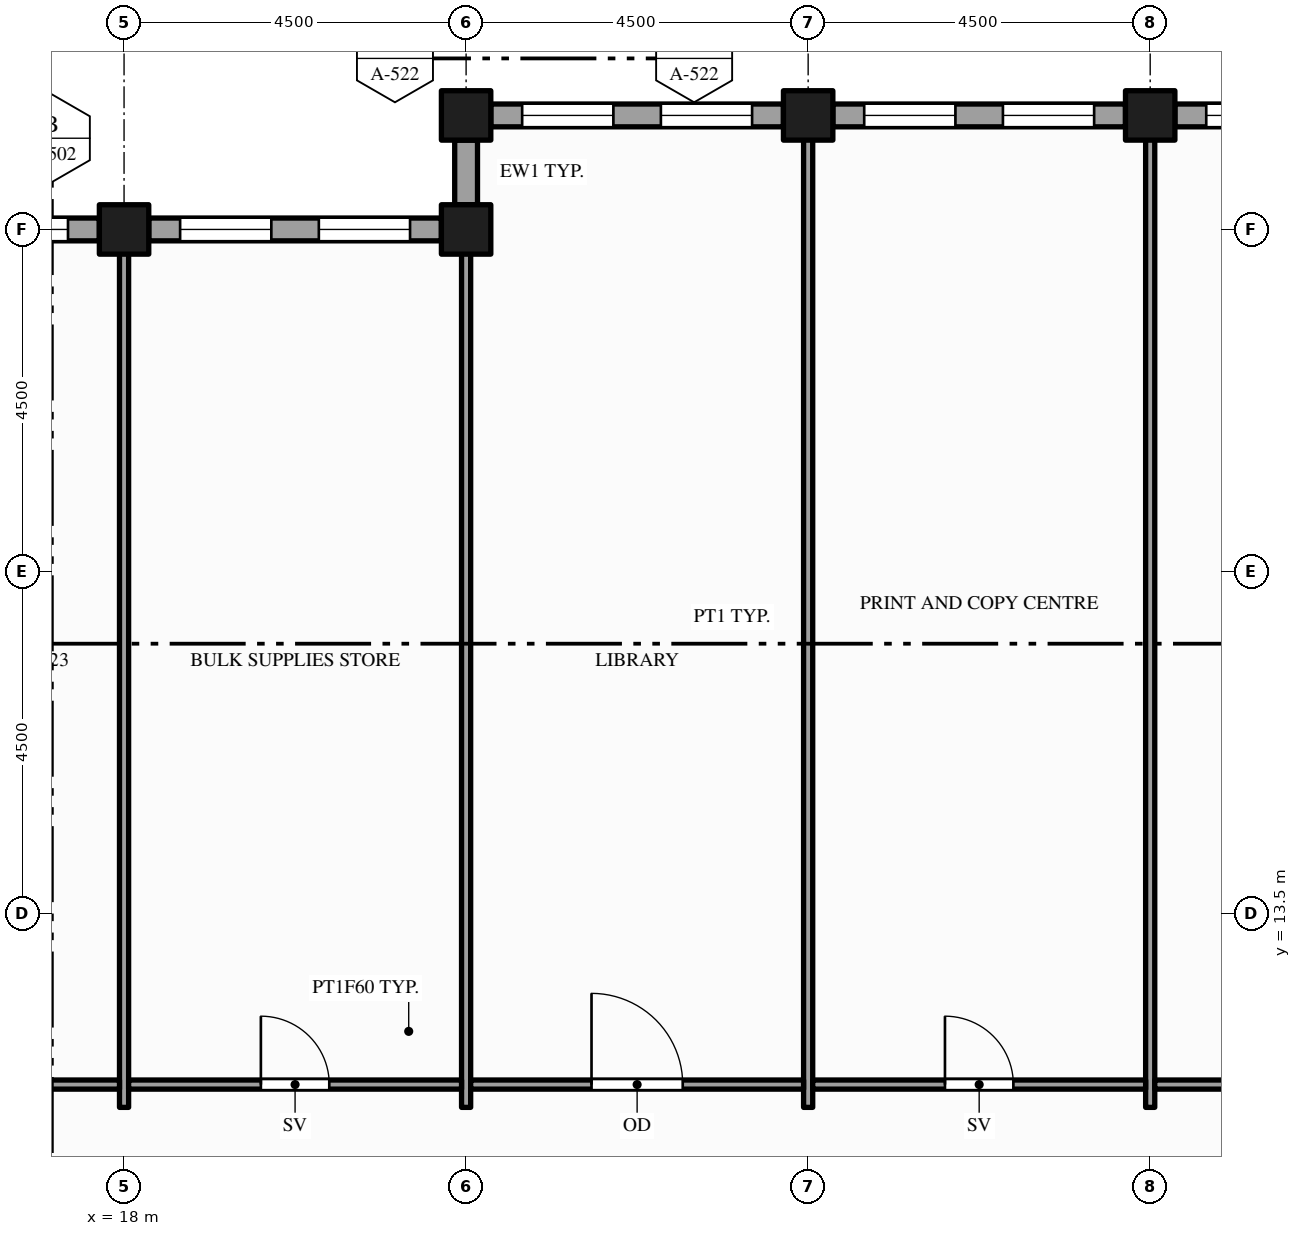
"""IFC4 building model, lengths in metres.
Left out: names, types, materials, properties, quantities, classifications, styles, units other than length and angle.
Written with IfcOpenShell. Run it as: python <this file> out.ifc"""

import sys

from ifc_helpers import new_model, si_unit, direction, frame, frame_2d, origin, origin_2d, place, context, subcontext, project, spatial, rectangle, hollow_rectangle, extrude, element, fill, save


model = new_model("IFC4")
c1 = context("Model", 3, precision=1e-05, world=origin(), true_north=direction((0.0, 1.0)))
c2 = subcontext(c1, "Body", "Model", "MODEL_VIEW")
j1 = project(units=[si_unit("LENGTHUNIT", "METRE"), si_unit("PLANEANGLEUNIT", "RADIAN")], contexts=[c1])
p1 = place(None, origin())
s1 = spatial("IfcSite", under=j1, at=p1, CompositionType="ELEMENT")
p2 = place(p1, origin())
s2 = spatial("IfcBuilding", under=s1, at=p2, CompositionType="ELEMENT")
p3 = place(p2, frame((0.0, 0.0, 293.0)))
s3 = spatial("IfcBuildingStorey", under=s2, at=p3, CompositionType="ELEMENT", Elevation=293.0)
for number, where, z_axis, x_axis in (
    (1, (18.0, 22.5, -0.15), (0.0, 0.0, 1.0), (1.0, 0.0, 0.0)),
    (2, (22.5, 22.5, -0.15), (0.0, 0.0, 1.0), (1.0, 0.0, 0.0)),
    (3, (22.5, 24.0, -0.15), (0.0, 0.0, 1.0), (1.0, 0.0, 0.0)),
    (4, (27.0, 24.0, -0.15), (0.0, 0.0, 1.0), (1.0, 0.0, 0.0)),
    (5, (31.5, 24.0, -0.15), (0.0, 0.0, 1.0), (1.0, 0.0, 0.0)),
):
    element("IfcColumn", number, at=place(p3, frame(where, z_axis=z_axis, x_axis=x_axis)), inside=s3, PredefinedType="COLUMN", context=c2, shape_type="SweptSolid", body=[
        extrude(hollow_rectangle(XDim=0.65, YDim=0.65, WallThickness=0.032, at=origin_2d()), origin(), (0.0, 0.0, 1.0), 3.9),
    ])
p4 = place(p3, frame((35.675, 24.0, 0.0), z_axis=(0.0, 0.0, 1.0), x_axis=(-1.0, 0.0, 0.0)))
e6 = element("IfcWall", 6, at=p4, inside=s3, PredefinedType="STANDARD", context=c2, shape_type="SweptSolid", body=[
    extrude(rectangle(XDim=3.85, YDim=0.3, at=frame_2d((1.925, 0.0))), origin(), (0.0, 0.0, 1.0), 3.062),
])
p5 = place(p4, frame((0.413, 0.0, 0.9)))
e7 = element("IfcOpeningElement", 7, at=p5, cuts=e6, PredefinedType="OPENING", context=c2, shape_type="SweptSolid", body=[
    extrude(rectangle(XDim=1.2, YDim=2.0, at=frame_2d((0.6, 1.0))), frame((0.0, 0.16, 0.0), z_axis=(0.0, -1.0, 0.0), x_axis=(1.0, 0.0, 0.0)), (0.0, 0.0, 1.0), 0.32),
])
p6 = place(p4, frame((2.238, 0.0, 0.9)))
e8 = element("IfcOpeningElement", 8, at=p6, cuts=e6, PredefinedType="OPENING", context=c2, shape_type="SweptSolid", body=[
    extrude(rectangle(XDim=1.2, YDim=2.0, at=frame_2d((0.6, 1.0))), frame((0.0, 0.16, 0.0), z_axis=(0.0, -1.0, 0.0), x_axis=(1.0, 0.0, 0.0)), (0.0, 0.0, 1.0), 0.32),
])
p7 = place(p3, frame((31.175, 24.0, 0.0), z_axis=(0.0, 0.0, 1.0), x_axis=(-1.0, 0.0, 0.0)))
e9 = element("IfcWall", 9, at=p7, inside=s3, PredefinedType="STANDARD", context=c2, shape_type="SweptSolid", body=[
    extrude(rectangle(XDim=3.85, YDim=0.3, at=frame_2d((1.925, 0.0))), origin(), (0.0, 0.0, 1.0), 3.062),
])
p8 = place(p7, frame((0.413, 0.0, 0.9)))
e10 = element("IfcOpeningElement", 10, at=p8, cuts=e9, PredefinedType="OPENING", context=c2, shape_type="SweptSolid", body=[
    extrude(rectangle(XDim=1.2, YDim=2.0, at=frame_2d((0.6, 1.0))), frame((0.0, 0.16, 0.0), z_axis=(0.0, -1.0, 0.0), x_axis=(1.0, 0.0, 0.0)), (0.0, 0.0, 1.0), 0.32),
])
p9 = place(p7, frame((2.238, 0.0, 0.9)))
e11 = element("IfcOpeningElement", 11, at=p9, cuts=e9, PredefinedType="OPENING", context=c2, shape_type="SweptSolid", body=[
    extrude(rectangle(XDim=1.2, YDim=2.0, at=frame_2d((0.6, 1.0))), frame((0.0, 0.16, 0.0), z_axis=(0.0, -1.0, 0.0), x_axis=(1.0, 0.0, 0.0)), (0.0, 0.0, 1.0), 0.32),
])
p10 = place(p3, frame((26.675, 24.0, 0.0), z_axis=(0.0, 0.0, 1.0), x_axis=(-1.0, 0.0, 0.0)))
e12 = element("IfcWall", 12, at=p10, inside=s3, PredefinedType="STANDARD", context=c2, shape_type="SweptSolid", body=[
    extrude(rectangle(XDim=3.85, YDim=0.3, at=frame_2d((1.925, 0.0))), origin(), (0.0, 0.0, 1.0), 3.062),
])
p11 = place(p10, frame((0.413, 0.0, 0.9)))
e13 = element("IfcOpeningElement", 13, at=p11, cuts=e12, PredefinedType="OPENING", context=c2, shape_type="SweptSolid", body=[
    extrude(rectangle(XDim=1.2, YDim=2.0, at=frame_2d((0.6, 1.0))), frame((0.0, 0.16, 0.0), z_axis=(0.0, -1.0, 0.0), x_axis=(1.0, 0.0, 0.0)), (0.0, 0.0, 1.0), 0.32),
])
p12 = place(p10, frame((2.238, 0.0, 0.9)))
e14 = element("IfcOpeningElement", 14, at=p12, cuts=e12, PredefinedType="OPENING", context=c2, shape_type="SweptSolid", body=[
    extrude(rectangle(XDim=1.2, YDim=2.0, at=frame_2d((0.6, 1.0))), frame((0.0, 0.16, 0.0), z_axis=(0.0, -1.0, 0.0), x_axis=(1.0, 0.0, 0.0)), (0.0, 0.0, 1.0), 0.32),
])
p13 = place(p3, frame((22.5, 23.675, 0.0), z_axis=(0.0, 0.0, 1.0), x_axis=(0.0, -1.0, 0.0)))
e15 = element("IfcWall", 15, at=p13, inside=s3, PredefinedType="STANDARD", context=c2, shape_type="SweptSolid", body=[
    extrude(rectangle(XDim=0.85, YDim=0.3, at=frame_2d((0.425, 0.0))), origin(), (0.0, 0.0, 1.0), 3.062),
])
p14 = place(p3, frame((22.175, 22.5, 0.0), z_axis=(0.0, 0.0, 1.0), x_axis=(-1.0, 0.0, 0.0)))
e16 = element("IfcWall", 16, at=p14, inside=s3, PredefinedType="STANDARD", context=c2, shape_type="SweptSolid", body=[
    extrude(rectangle(XDim=3.85, YDim=0.3, at=frame_2d((1.925, 0.0))), origin(), (0.0, 0.0, 1.0), 3.062),
])
p15 = place(p14, frame((0.413, 0.0, 0.9)))
e17 = element("IfcOpeningElement", 17, at=p15, cuts=e16, PredefinedType="OPENING", context=c2, shape_type="SweptSolid", body=[
    extrude(rectangle(XDim=1.2, YDim=2.0, at=frame_2d((0.6, 1.0))), frame((0.0, 0.16, 0.0), z_axis=(0.0, -1.0, 0.0), x_axis=(1.0, 0.0, 0.0)), (0.0, 0.0, 1.0), 0.32),
])
p16 = place(p14, frame((2.238, 0.0, 0.9)))
e18 = element("IfcOpeningElement", 18, at=p16, cuts=e16, PredefinedType="OPENING", context=c2, shape_type="SweptSolid", body=[
    extrude(rectangle(XDim=1.2, YDim=2.0, at=frame_2d((0.6, 1.0))), frame((0.0, 0.16, 0.0), z_axis=(0.0, -1.0, 0.0), x_axis=(1.0, 0.0, 0.0)), (0.0, 0.0, 1.0), 0.32),
])
p17 = place(p3, frame((17.675, 22.5, 0.0), z_axis=(0.0, 0.0, 1.0), x_axis=(-1.0, 0.0, 0.0)))
e19 = element("IfcWall", 19, at=p17, inside=s3, PredefinedType="STANDARD", context=c2, shape_type="SweptSolid", body=[
    extrude(rectangle(XDim=3.85, YDim=0.3, at=frame_2d((1.925, 0.0))), origin(), (0.0, 0.0, 1.0), 3.062),
])
p18 = place(p17, frame((0.413, 0.0, 0.9)))
e20 = element("IfcOpeningElement", 20, at=p18, cuts=e19, PredefinedType="OPENING", context=c2, shape_type="SweptSolid", body=[
    extrude(rectangle(XDim=1.2, YDim=2.0, at=frame_2d((0.6, 1.0))), frame((0.0, 0.16, 0.0), z_axis=(0.0, -1.0, 0.0), x_axis=(1.0, 0.0, 0.0)), (0.0, 0.0, 1.0), 0.32),
])
p19 = place(p17, frame((2.238, 0.0, 0.9)))
e21 = element("IfcOpeningElement", 21, at=p19, cuts=e19, PredefinedType="OPENING", context=c2, shape_type="SweptSolid", body=[
    extrude(rectangle(XDim=1.2, YDim=2.0, at=frame_2d((0.6, 1.0))), frame((0.0, 0.16, 0.0), z_axis=(0.0, -1.0, 0.0), x_axis=(1.0, 0.0, 0.0)), (0.0, 0.0, 1.0), 0.32),
])
for number, where, z_axis, x_axis in (
    (22, (18.0, 10.95, 0.0), (0.0, 0.0, 1.0), (0.0, 1.0, 0.0)),
    (23, (22.5, 10.95, 0.0), (0.0, 0.0, 1.0), (0.0, 1.0, 0.0)),
):
    element("IfcWall", number, at=place(p3, frame(where, z_axis=z_axis, x_axis=x_axis)), inside=s3, PredefinedType="PARTITIONING", context=c2, shape_type="SweptSolid", body=[
        extrude(rectangle(XDim=11.4, YDim=0.12, at=frame_2d((5.7, 0.0))), origin(), (0.0, 0.0, 1.0), 2.77),
    ])
for number, where, z_axis, x_axis in (
    (24, (27.0, 10.95, 0.0), (0.0, 0.0, 1.0), (0.0, 1.0, 0.0)),
    (25, (31.5, 10.95, 0.0), (0.0, 0.0, 1.0), (0.0, 1.0, 0.0)),
):
    element("IfcWall", number, at=place(p3, frame(where, z_axis=z_axis, x_axis=x_axis)), inside=s3, PredefinedType="PARTITIONING", context=c2, shape_type="SweptSolid", body=[
        extrude(rectangle(XDim=12.9, YDim=0.12, at=frame_2d((6.45, 0.0))), origin(), (0.0, 0.0, 1.0), 2.35),
    ])
p20 = place(p3, frame((13.56, 11.25, 0.0), z_axis=(0.0, 0.0, 1.0), x_axis=(1.0, 0.0, 0.0)))
e26 = element("IfcWall", 26, at=p20, inside=s3, PredefinedType="PARTITIONING", context=c2, shape_type="SweptSolid", body=[
    extrude(rectangle(XDim=4.38, YDim=0.12, at=frame_2d((2.19, 0.0))), origin(), (0.0, 0.0, 1.0), 2.77),
])
p21 = place(p20, frame((1.69, 0.0, 0.0)))
e27 = element("IfcOpeningElement", 27, at=p21, cuts=e26, PredefinedType="OPENING", context=c2, shape_type="SweptSolid", body=[
    extrude(rectangle(XDim=1.0, YDim=2.1, at=frame_2d((0.5, 1.05))), frame((0.0, 0.07, 0.0), z_axis=(0.0, -1.0, 0.0), x_axis=(1.0, 0.0, 0.0)), (0.0, 0.0, 1.0), 0.14),
])
p22 = place(p3, frame((18.06, 11.25, 0.0), z_axis=(0.0, 0.0, 1.0), x_axis=(1.0, 0.0, 0.0)))
e28 = element("IfcWall", 28, at=p22, inside=s3, PredefinedType="PARTITIONING", context=c2, shape_type="SweptSolid", body=[
    extrude(rectangle(XDim=4.38, YDim=0.12, at=frame_2d((2.19, 0.0))), origin(), (0.0, 0.0, 1.0), 2.77),
])
p23 = place(p22, frame((1.74, 0.0, 0.0)))
e29 = element("IfcOpeningElement", 29, at=p23, cuts=e28, PredefinedType="OPENING", context=c2, shape_type="SweptSolid", body=[
    extrude(rectangle(XDim=0.9, YDim=2.1, at=frame_2d((0.45, 1.05))), frame((0.0, 0.07, 0.0), z_axis=(0.0, -1.0, 0.0), x_axis=(1.0, 0.0, 0.0)), (0.0, 0.0, 1.0), 0.14),
])
p24 = place(p3, frame((22.56, 11.25, 0.0), z_axis=(0.0, 0.0, 1.0), x_axis=(1.0, 0.0, 0.0)))
e30 = element("IfcWall", 30, at=p24, inside=s3, PredefinedType="PARTITIONING", context=c2, shape_type="SweptSolid", body=[
    extrude(rectangle(XDim=4.38, YDim=0.12, at=frame_2d((2.19, 0.0))), origin(), (0.0, 0.0, 1.0), 2.77),
])
p25 = place(p24, frame((1.59, 0.0, 0.0)))
e31 = element("IfcOpeningElement", 31, at=p25, cuts=e30, PredefinedType="OPENING", context=c2, shape_type="SweptSolid", body=[
    extrude(rectangle(XDim=1.2, YDim=2.1, at=frame_2d((0.6, 1.05))), frame((0.0, 0.07, 0.0), z_axis=(0.0, -1.0, 0.0), x_axis=(1.0, 0.0, 0.0)), (0.0, 0.0, 1.0), 0.14),
])
p26 = place(p3, frame((27.06, 11.25, 0.0), z_axis=(0.0, 0.0, 1.0), x_axis=(1.0, 0.0, 0.0)))
e32 = element("IfcWall", 32, at=p26, inside=s3, PredefinedType="PARTITIONING", context=c2, shape_type="SweptSolid", body=[
    extrude(rectangle(XDim=4.38, YDim=0.12, at=frame_2d((2.19, 0.0))), origin(), (0.0, 0.0, 1.0), 2.77),
])
p27 = place(p26, frame((1.74, 0.0, 0.0)))
e33 = element("IfcOpeningElement", 33, at=p27, cuts=e32, PredefinedType="OPENING", context=c2, shape_type="SweptSolid", body=[
    extrude(rectangle(XDim=0.9, YDim=2.1, at=frame_2d((0.45, 1.05))), frame((0.0, 0.07, 0.0), z_axis=(0.0, -1.0, 0.0), x_axis=(1.0, 0.0, 0.0)), (0.0, 0.0, 1.0), 0.14),
])
p28 = place(p3, frame((31.56, 11.25, 0.0), z_axis=(0.0, 0.0, 1.0), x_axis=(1.0, 0.0, 0.0)))
e34 = element("IfcWall", 34, at=p28, inside=s3, PredefinedType="PARTITIONING", context=c2, shape_type="SweptSolid", body=[
    extrude(rectangle(XDim=15.63, YDim=0.12, at=frame_2d((7.815, 0.0))), origin(), (0.0, 0.0, 1.0), 2.77),
])
p29 = place(p28, frame((7.315, 0.0, 0.0)))
e35 = element("IfcOpeningElement", 35, at=p29, cuts=e34, PredefinedType="OPENING", context=c2, shape_type="SweptSolid", body=[
    extrude(rectangle(XDim=1.0, YDim=2.1, at=frame_2d((0.5, 1.05))), frame((0.0, 0.07, 0.0), z_axis=(0.0, -1.0, 0.0), x_axis=(1.0, 0.0, 0.0)), (0.0, 0.0, 1.0), 0.14),
])
p30 = place(p6, origin())
e36 = element("IfcWindow", 36, at=p30, inside=s3, PartitioningType="SINGLE_PANEL", PredefinedType="WINDOW", context=c2, shape_type="SweptSolid", body=[
    extrude(rectangle(XDim=1.2, YDim=2.0, at=frame_2d((0.6, 1.0))), frame((0.0, 0.03, 0.0), z_axis=(0.0, -1.0, 0.0), x_axis=(1.0, 0.0, 0.0)), (0.0, 0.0, 1.0), 0.06),
])
fill(e8, e36)
p31 = place(p8, origin())
e37 = element("IfcWindow", 37, at=p31, inside=s3, PartitioningType="SINGLE_PANEL", PredefinedType="WINDOW", context=c2, shape_type="SweptSolid", body=[
    extrude(rectangle(XDim=1.2, YDim=2.0, at=frame_2d((0.6, 1.0))), frame((0.0, 0.03, 0.0), z_axis=(0.0, -1.0, 0.0), x_axis=(1.0, 0.0, 0.0)), (0.0, 0.0, 1.0), 0.06),
])
fill(e10, e37)
p32 = place(p9, origin())
e38 = element("IfcWindow", 38, at=p32, inside=s3, PartitioningType="SINGLE_PANEL", PredefinedType="WINDOW", context=c2, shape_type="SweptSolid", body=[
    extrude(rectangle(XDim=1.2, YDim=2.0, at=frame_2d((0.6, 1.0))), frame((0.0, 0.03, 0.0), z_axis=(0.0, -1.0, 0.0), x_axis=(1.0, 0.0, 0.0)), (0.0, 0.0, 1.0), 0.06),
])
fill(e11, e38)
p33 = place(p11, origin())
e39 = element("IfcWindow", 39, at=p33, inside=s3, PartitioningType="SINGLE_PANEL", PredefinedType="WINDOW", context=c2, shape_type="SweptSolid", body=[
    extrude(rectangle(XDim=1.2, YDim=2.0, at=frame_2d((0.6, 1.0))), frame((0.0, 0.03, 0.0), z_axis=(0.0, -1.0, 0.0), x_axis=(1.0, 0.0, 0.0)), (0.0, 0.0, 1.0), 0.06),
])
fill(e13, e39)
p34 = place(p12, origin())
e40 = element("IfcWindow", 40, at=p34, inside=s3, PartitioningType="SINGLE_PANEL", PredefinedType="WINDOW", context=c2, shape_type="SweptSolid", body=[
    extrude(rectangle(XDim=1.2, YDim=2.0, at=frame_2d((0.6, 1.0))), frame((0.0, 0.03, 0.0), z_axis=(0.0, -1.0, 0.0), x_axis=(1.0, 0.0, 0.0)), (0.0, 0.0, 1.0), 0.06),
])
fill(e14, e40)
p35 = place(p15, origin())
e41 = element("IfcWindow", 41, at=p35, inside=s3, PartitioningType="SINGLE_PANEL", PredefinedType="WINDOW", context=c2, shape_type="SweptSolid", body=[
    extrude(rectangle(XDim=1.2, YDim=2.0, at=frame_2d((0.6, 1.0))), frame((0.0, 0.03, 0.0), z_axis=(0.0, -1.0, 0.0), x_axis=(1.0, 0.0, 0.0)), (0.0, 0.0, 1.0), 0.06),
])
fill(e17, e41)
p36 = place(p16, origin())
e42 = element("IfcWindow", 42, at=p36, inside=s3, PartitioningType="SINGLE_PANEL", PredefinedType="WINDOW", context=c2, shape_type="SweptSolid", body=[
    extrude(rectangle(XDim=1.2, YDim=2.0, at=frame_2d((0.6, 1.0))), frame((0.0, 0.03, 0.0), z_axis=(0.0, -1.0, 0.0), x_axis=(1.0, 0.0, 0.0)), (0.0, 0.0, 1.0), 0.06),
])
fill(e18, e42)
p37 = place(p18, origin())
e43 = element("IfcWindow", 43, at=p37, inside=s3, PartitioningType="SINGLE_PANEL", PredefinedType="WINDOW", context=c2, shape_type="SweptSolid", body=[
    extrude(rectangle(XDim=1.2, YDim=2.0, at=frame_2d((0.6, 1.0))), frame((0.0, 0.03, 0.0), z_axis=(0.0, -1.0, 0.0), x_axis=(1.0, 0.0, 0.0)), (0.0, 0.0, 1.0), 0.06),
])
fill(e20, e43)
p38 = place(p23, origin())
e44 = element("IfcDoor", 44, at=p38, inside=s3, OperationType="SINGLE_SWING_LEFT", PredefinedType="DOOR", context=c2, shape_type="SweptSolid", body=[
    extrude(rectangle(XDim=0.9, YDim=2.1, at=frame_2d((0.45, 1.05))), frame((0.0, 0.025, 0.0), z_axis=(0.0, -1.0, 0.0), x_axis=(1.0, 0.0, 0.0)), (0.0, 0.0, 1.0), 0.05),
])
fill(e29, e44)
p39 = place(p25, origin())
e45 = element("IfcDoor", 45, at=p39, inside=s3, OperationType="SINGLE_SWING_LEFT", PredefinedType="DOOR", context=c2, shape_type="SweptSolid", body=[
    extrude(rectangle(XDim=1.2, YDim=2.1, at=frame_2d((0.6, 1.05))), frame((0.0, 0.025, 0.0), z_axis=(0.0, -1.0, 0.0), x_axis=(1.0, 0.0, 0.0)), (0.0, 0.0, 1.0), 0.05),
])
fill(e31, e45)
p40 = place(p27, origin())
e46 = element("IfcDoor", 46, at=p40, inside=s3, OperationType="SINGLE_SWING_LEFT", PredefinedType="DOOR", context=c2, shape_type="SweptSolid", body=[
    extrude(rectangle(XDim=0.9, YDim=2.1, at=frame_2d((0.45, 1.05))), frame((0.0, 0.025, 0.0), z_axis=(0.0, -1.0, 0.0), x_axis=(1.0, 0.0, 0.0)), (0.0, 0.0, 1.0), 0.05),
])
fill(e33, e46)
save(model, sys.argv[1])
